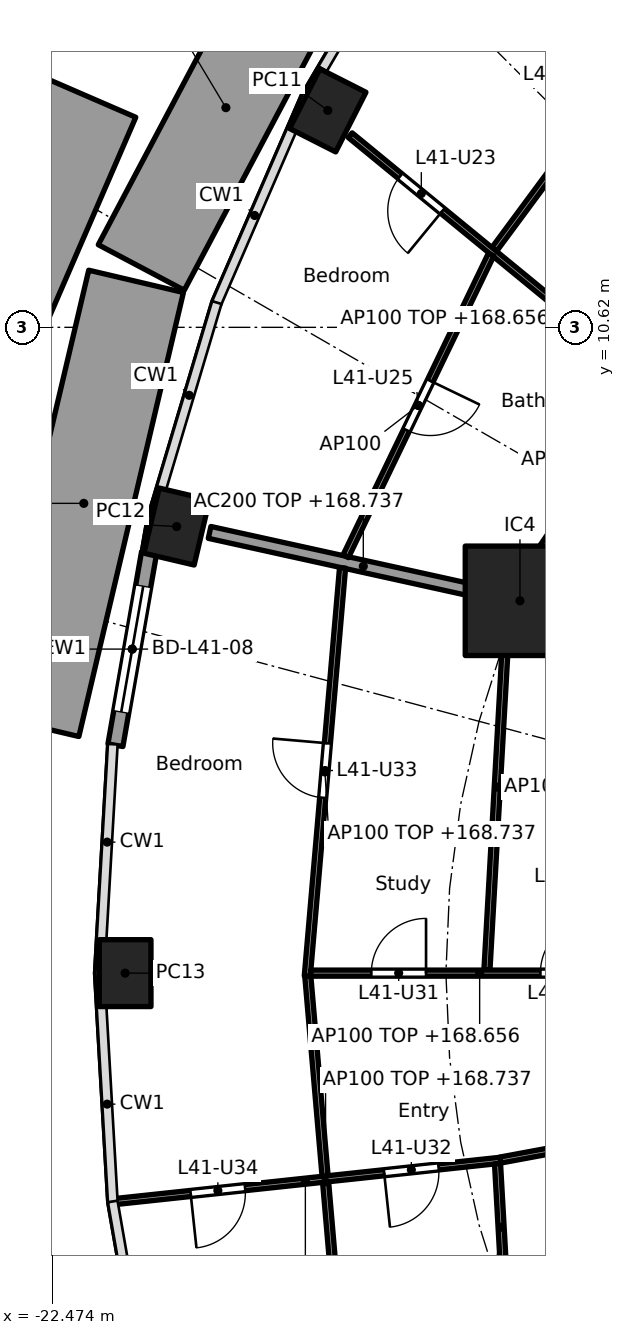
"""IFC4 building model, lengths in metres.
Left out: names, types, materials, properties, quantities, classifications, styles, units other than length and angle.
Written with IfcOpenShell. Run it as: python <this file> out.ifc"""

import sys

from ifc_helpers import new_model, si_unit, direction, frame, frame_2d, origin, origin_2d, place, context, subcontext, project, spatial, rectangle, hollow_rectangle, extrude, element, fill, save


model = new_model("IFC4")
c1 = context("Model", 3, precision=1e-05, world=origin(), true_north=direction((0.0, 1.0)))
c2 = subcontext(c1, "Body", "Model", "MODEL_VIEW")
j1 = project(units=[si_unit("LENGTHUNIT", "METRE"), si_unit("PLANEANGLEUNIT", "RADIAN")], contexts=[c1])
p1 = place(None, origin())
s1 = spatial("IfcSite", under=j1, at=p1, CompositionType="ELEMENT")
p2 = place(p1, origin())
s2 = spatial("IfcBuilding", under=s1, at=p2, CompositionType="ELEMENT")
p3 = place(p2, frame((0.0, 0.0, 165.9)))
s3 = spatial("IfcBuildingStorey", under=s2, at=p3, CompositionType="ELEMENT", Elevation=165.9)
for number, where, z_axis, x_axis in (
    (1, (-17.942, 14.188, -0.26), (0.0, 0.0, 1.0), (-0.452, -0.892, 0.0)),
    (2, (-20.427, 7.344, -0.26), (0.0, 0.0, 1.0), (-0.229, -0.973, 0.0)),
    (3, (-21.275, 0.0, -0.26), (0.0, 0.0, 1.0), (0.0, -1.0, 0.0)),
):
    element("IfcColumn", number, at=place(p3, frame(where, z_axis=z_axis, x_axis=x_axis)), inside=s3, PredefinedType="COLUMN", context=c2, shape_type="SweptSolid", body=[
        extrude(hollow_rectangle(XDim=1.1, YDim=0.85, WallThickness=0.036, at=origin_2d()), origin(), (0.0, 0.0, 1.0), 3.96),
    ])
p4 = place(p3, frame((-14.782, 6.123, 0.0), z_axis=(0.0, 0.0, 1.0), x_axis=(1.0, 0.0, 0.0)))
e4 = element("IfcColumn", 4, at=p4, inside=s3, PredefinedType="COLUMN", context=c2, shape_type="SweptSolid", body=[
    extrude(rectangle(XDim=1.8, YDim=1.8, at=origin_2d()), origin(), (0.0, 0.0, 1.0), 3.7),
])
p5 = place(p3, frame((-21.435, 3.747, 0.0), z_axis=(0.0, 0.0, 1.0), x_axis=(0.172223552479, 0.98505789067, 0.0)))
e5 = element("IfcWall", 5, at=p5, inside=s3, PredefinedType="SOLIDWALL", context=c2, shape_type="SweptSolid", body=[
    extrude(rectangle(XDim=3.211, YDim=0.25, at=frame_2d((1.605, 0.0))), origin(), (0.0, 0.0, 1.0), 3.44),
])
p6 = place(p5, frame((0.555, 0.0, 0.0)))
e6 = element("IfcOpeningElement", 6, at=p6, cuts=e5, PredefinedType="OPENING", context=c2, shape_type="SweptSolid", body=[
    extrude(rectangle(XDim=2.1, YDim=2.4, at=frame_2d((1.05, 1.2))), frame((0.0, 0.135, 0.0), z_axis=(0.0, -1.0, 0.0), x_axis=(1.0, 0.0, 0.0)), (0.0, 0.0, 1.0), 0.27),
])
p7 = place(p3, frame((-26.108, 4.525, 0.0), z_axis=(0.0, 0.0, 1.0), x_axis=(0.397508674367, 0.917598416413, 0.0)))
e7 = element("IfcWall", 7, at=p7, inside=s3, PredefinedType="SOLIDWALL", context=c2, shape_type="SweptSolid", body=[
    extrude(rectangle(XDim=10.753, YDim=1.6, at=frame_2d((5.376, 0.0))), origin(), (0.0, 0.0, 1.0), 1.1),
])
p8 = place(p3, frame((-21.095, 11.376, 0.0), z_axis=(0.0, 0.0, 1.0), x_axis=(-0.229218917717, -0.973374895793, 0.0)))
e8 = element("IfcWall", 8, at=p8, inside=s3, PredefinedType="SOLIDWALL", context=c2, shape_type="SweptSolid", body=[
    extrude(rectangle(XDim=7.501, YDim=1.6, at=frame_2d((3.751, 0.0))), origin(), (0.0, 0.0, 1.0), 1.1),
])
p9 = place(p3, frame((-18.227, 16.86, 0.0), z_axis=(0.0, 0.0, 1.0), x_axis=(-0.467931103726, -0.883764947351, 0.0)))
e9 = element("IfcWall", 9, at=p9, inside=s3, PredefinedType="SOLIDWALL", context=c2, shape_type="SweptSolid", body=[
    extrude(rectangle(XDim=5.947, YDim=1.6, at=frame_2d((2.973, 0.0))), origin(), (0.0, 0.0, 1.0), 1.1),
])
p10 = place(p3, frame((-12.657, 5.243, 0.0), z_axis=(0.0, 0.0, 1.0), x_axis=(-0.923859888513, 0.38273085373, 0.0)))
e10 = element("IfcWall", 10, at=p10, inside=s3, PredefinedType="PARTITIONING", context=c2, shape_type="SweptSolid", body=[
    extrude(rectangle(XDim=2.199, YDim=0.2, at=frame_2d((1.1, 0.0))), origin(), (0.0, 0.0, 1.0), 3.44),
])
p11 = place(p3, frame((-14.831, 6.134, 0.0), z_axis=(0.0, 0.0, 1.0), x_axis=(-0.976568396888, 0.215207263354, 0.0)))
e11 = element("IfcWall", 11, at=p11, inside=s3, PredefinedType="PARTITIONING", context=c2, shape_type="SweptSolid", body=[
    extrude(rectangle(XDim=5.177, YDim=0.2, at=frame_2d((2.588, 0.0))), origin(), (0.0, 0.0, 1.0), 2.837),
])
p12 = place(p3, frame((-11.773, 16.542, 0.0), z_axis=(0.0, 0.0, 1.0), x_axis=(-0.594694305999, -0.803951915485, 0.0)))
e12 = element("IfcWall", 12, at=p12, inside=s3, PredefinedType="PARTITIONING", context=c2, shape_type="SweptSolid", body=[
    extrude(rectangle(XDim=5.772, YDim=0.1, at=frame_2d((2.886, 0.0))), origin(), (0.0, 0.0, 1.0), 2.837),
])
p13 = place(p12, frame((2.461, 0.0, 0.0)))
e13 = element("IfcOpeningElement", 13, at=p13, cuts=e12, PredefinedType="OPENING", context=c2, shape_type="SweptSolid", body=[
    extrude(rectangle(XDim=0.9, YDim=2.1, at=frame_2d((0.45, 1.05))), frame((0.0, 0.06, 0.0), z_axis=(0.0, -1.0, 0.0), x_axis=(1.0, 0.0, 0.0)), (0.0, 0.0, 1.0), 0.12),
])
p14 = place(p3, frame((-10.189, 7.721, 0.0), z_axis=(0.0, 0.0, 1.0), x_axis=(-0.773134429339, 0.634242188892, 0.0)))
e14 = element("IfcWall", 14, at=p14, inside=s3, PredefinedType="PARTITIONING", context=c2, shape_type="SweptSolid", body=[
    extrude(rectangle(XDim=9.552, YDim=0.1, at=frame_2d((4.776, 0.0))), origin(), (0.0, 0.0, 1.0), 2.756),
])
p15 = place(p14, frame((7.59, 0.0, 0.0)))
e15 = element("IfcOpeningElement", 15, at=p15, cuts=e14, PredefinedType="OPENING", context=c2, shape_type="SweptSolid", body=[
    extrude(rectangle(XDim=0.9, YDim=2.1, at=frame_2d((0.45, 1.05))), frame((0.0, 0.06, 0.0), z_axis=(0.0, -1.0, 0.0), x_axis=(1.0, 0.0, 0.0)), (0.0, 0.0, 1.0), 0.12),
])
p16 = place(p14, frame((1.104, 0.0, 0.0)))
e16 = element("IfcOpeningElement", 16, at=p16, cuts=e14, PredefinedType="OPENING", context=c2, shape_type="SweptSolid", body=[
    extrude(rectangle(XDim=0.9, YDim=2.1, at=frame_2d((0.45, 1.05))), frame((0.0, 0.06, 0.0), z_axis=(0.0, -1.0, 0.0), x_axis=(1.0, 0.0, 0.0)), (0.0, 0.0, 1.0), 0.12),
])
p17 = place(p3, frame((-12.619, 9.65, 0.0), z_axis=(0.0, 0.0, 1.0), x_axis=(-0.561046521684, -0.82778427172, 0.0)))
e17 = element("IfcWall", 17, at=p17, inside=s3, PredefinedType="PARTITIONING", context=c2, shape_type="SweptSolid", body=[
    extrude(rectangle(XDim=4.109, YDim=0.1, at=frame_2d((2.054, 0.0))), origin(), (0.0, 0.0, 1.0), 3.44),
])
p18 = place(p3, frame((-15.257, 11.816, 0.0), z_axis=(0.0, 0.0, 1.0), x_axis=(-0.434027506504, -0.900899619046, 0.0)))
e18 = element("IfcWall", 18, at=p18, inside=s3, PredefinedType="PARTITIONING", context=c2, shape_type="SweptSolid", body=[
    extrude(rectangle(XDim=5.508, YDim=0.1, at=frame_2d((2.754, 0.0))), origin(), (0.0, 0.0, 1.0), 3.44),
])
p19 = place(p18, frame((2.304, 0.0, 0.0)))
e19 = element("IfcOpeningElement", 19, at=p19, cuts=e18, PredefinedType="OPENING", context=c2, shape_type="SweptSolid", body=[
    extrude(rectangle(XDim=0.9, YDim=2.1, at=frame_2d((0.45, 1.05))), frame((0.0, 0.06, 0.0), z_axis=(0.0, -1.0, 0.0), x_axis=(1.0, 0.0, 0.0)), (0.0, 0.0, 1.0), 0.12),
])
p20 = place(p3, frame((-14.986, 6.067, 0.0), z_axis=(0.0, 0.0, 1.0), x_axis=(-0.056311398802, -0.998413254302, 0.0)))
e20 = element("IfcWall", 20, at=p20, inside=s3, PredefinedType="PARTITIONING", context=c2, shape_type="SweptSolid", body=[
    extrude(rectangle(XDim=6.026, YDim=0.1, at=frame_2d((3.013, 0.0))), origin(), (0.0, 0.0, 1.0), 2.837),
])
p21 = place(p3, frame((-17.7, 6.664, 0.0), z_axis=(0.0, 0.0, 1.0), x_axis=(-0.086004282666, -0.996294767307, 0.0)))
e21 = element("IfcWall", 21, at=p21, inside=s3, PredefinedType="PARTITIONING", context=c2, shape_type="SweptSolid", body=[
    extrude(rectangle(XDim=6.739, YDim=0.1, at=frame_2d((3.37, 0.0))), origin(), (0.0, 0.0, 1.0), 2.837),
])
p22 = place(p21, frame((2.895, 0.0, 0.0)))
e22 = element("IfcOpeningElement", 22, at=p22, cuts=e21, PredefinedType="OPENING", context=c2, shape_type="SweptSolid", body=[
    extrude(rectangle(XDim=0.9, YDim=2.1, at=frame_2d((0.45, 1.05))), frame((0.0, 0.06, 0.0), z_axis=(0.0, -1.0, 0.0), x_axis=(1.0, 0.0, 0.0)), (0.0, 0.0, 1.0), 0.12),
])
p23 = place(p3, frame((-12.665, 0.0, 0.0), z_axis=(0.0, 0.0, 1.0), x_axis=(-1.0, 0.0, 0.0)))
e23 = element("IfcWall", 23, at=p23, inside=s3, PredefinedType="PARTITIONING", context=c2, shape_type="SweptSolid", body=[
    extrude(rectangle(XDim=5.56, YDim=0.1, at=frame_2d((2.78, 0.0))), origin(), (0.0, 0.0, 1.0), 2.756),
])
p24 = place(p23, frame((0.882, 0.0, 0.0)))
e24 = element("IfcOpeningElement", 24, at=p24, cuts=e23, PredefinedType="OPENING", context=c2, shape_type="SweptSolid", body=[
    extrude(rectangle(XDim=0.9, YDim=2.1, at=frame_2d((0.45, 1.05))), frame((0.0, 0.06, 0.0), z_axis=(0.0, -1.0, 0.0), x_axis=(1.0, 0.0, 0.0)), (0.0, 0.0, 1.0), 0.12),
])
p25 = place(p23, frame((3.662, 0.0, 0.0)))
e25 = element("IfcOpeningElement", 25, at=p25, cuts=e23, PredefinedType="OPENING", context=c2, shape_type="SweptSolid", body=[
    extrude(rectangle(XDim=0.9, YDim=2.1, at=frame_2d((0.45, 1.05))), frame((0.0, 0.06, 0.0), z_axis=(0.0, -1.0, 0.0), x_axis=(1.0, 0.0, 0.0)), (0.0, 0.0, 1.0), 0.12),
])
p26 = place(p3, frame((-18.271, -0.05, 0.0), z_axis=(0.0, 0.0, 1.0), x_axis=(0.086018199227, -0.996293565874, 0.0)))
e26 = element("IfcWall", 26, at=p26, inside=s3, PredefinedType="PARTITIONING", context=c2, shape_type="SweptSolid", body=[
    extrude(rectangle(XDim=6.789, YDim=0.1, at=frame_2d((3.395, 0.0))), origin(), (0.0, 0.0, 1.0), 2.837),
])
p27 = place(p3, frame((-12.663, -2.621, 0.0), z_axis=(0.0, 0.0, 1.0), x_axis=(-0.983176884312, -0.182655999505, 0.0)))
e27 = element("IfcWall", 27, at=p27, inside=s3, PredefinedType="PARTITIONING", context=c2, shape_type="SweptSolid", body=[
    extrude(rectangle(XDim=2.483, YDim=0.1, at=frame_2d((1.242, 0.0))), origin(), (0.0, 0.0, 1.0), 2.756),
])
p28 = place(p27, frame((0.792, 0.0, 0.0)))
e28 = element("IfcOpeningElement", 28, at=p28, cuts=e27, PredefinedType="OPENING", context=c2, shape_type="SweptSolid", body=[
    extrude(rectangle(XDim=0.9, YDim=2.1, at=frame_2d((0.45, 1.05))), frame((0.0, 0.06, 0.0), z_axis=(0.0, -1.0, 0.0), x_axis=(1.0, 0.0, 0.0)), (0.0, 0.0, 1.0), 0.12),
])
p29 = place(p3, frame((-15.104, -3.078, 0.0), z_axis=(0.0, 0.0, 1.0), x_axis=(-0.994316167803, -0.106467640365, 0.0)))
e29 = element("IfcWall", 29, at=p29, inside=s3, PredefinedType="PARTITIONING", context=c2, shape_type="SweptSolid", body=[
    extrude(rectangle(XDim=6.45, YDim=0.1, at=frame_2d((3.225, 0.0))), origin(), (0.0, 0.0, 1.0), 2.905),
])
p30 = place(p29, frame((1.022, 0.0, 0.0)))
e30 = element("IfcOpeningElement", 30, at=p30, cuts=e29, PredefinedType="OPENING", context=c2, shape_type="SweptSolid", body=[
    extrude(rectangle(XDim=0.9, YDim=2.1, at=frame_2d((0.45, 1.05))), frame((0.0, 0.06, 0.0), z_axis=(0.0, -1.0, 0.0), x_axis=(1.0, 0.0, 0.0)), (0.0, 0.0, 1.0), 0.12),
])
p31 = place(p29, frame((4.223, 0.0, 0.0)))
e31 = element("IfcOpeningElement", 31, at=p31, cuts=e29, PredefinedType="OPENING", context=c2, shape_type="SweptSolid", body=[
    extrude(rectangle(XDim=0.9, YDim=2.1, at=frame_2d((0.45, 1.05))), frame((0.0, 0.06, 0.0), z_axis=(0.0, -1.0, 0.0), x_axis=(1.0, 0.0, 0.0)), (0.0, 0.0, 1.0), 0.12),
])
p32 = place(p3, frame((-15.151, -3.133, 0.0), z_axis=(0.0, 0.0, 1.0), x_axis=(0.05637501378, -0.998409664327, 0.0)))
e32 = element("IfcWall", 32, at=p32, inside=s3, PredefinedType="PARTITIONING", context=c2, shape_type="SweptSolid", body=[
    extrude(rectangle(XDim=2.988, YDim=0.1, at=frame_2d((1.494, 0.0))), origin(), (0.0, 0.0, 1.0), 2.837),
])
p33 = place(p6, origin())
e33 = element("IfcDoor", 33, at=p33, inside=s3, OperationType="SLIDING_TO_LEFT", PredefinedType="DOOR", context=c2, shape_type="SweptSolid", body=[
    extrude(rectangle(XDim=2.1, YDim=2.4, at=frame_2d((1.05, 1.2))), frame((0.0, 0.025, 0.0), z_axis=(0.0, -1.0, 0.0), x_axis=(1.0, 0.0, 0.0)), (0.0, 0.0, 1.0), 0.05),
])
fill(e6, e33)
p34 = place(p15, origin())
e34 = element("IfcDoor", 34, at=p34, inside=s3, OperationType="SINGLE_SWING_LEFT", PredefinedType="DOOR", context=c2, shape_type="SweptSolid", body=[
    extrude(rectangle(XDim=0.9, YDim=2.1, at=frame_2d((0.45, 1.05))), frame((0.0, 0.025, 0.0), z_axis=(0.0, -1.0, 0.0), x_axis=(1.0, 0.0, 0.0)), (0.0, 0.0, 1.0), 0.05),
])
fill(e15, e34)
p35 = place(p19, origin())
e35 = element("IfcDoor", 35, at=p35, inside=s3, OperationType="SINGLE_SWING_LEFT", PredefinedType="DOOR", context=c2, shape_type="SweptSolid", body=[
    extrude(rectangle(XDim=0.9, YDim=2.1, at=frame_2d((0.45, 1.05))), frame((0.0, 0.025, 0.0), z_axis=(0.0, -1.0, 0.0), x_axis=(1.0, 0.0, 0.0)), (0.0, 0.0, 1.0), 0.05),
])
fill(e19, e35)
p36 = place(p24, frame((0.9, 0.0, 0.0), x_axis=(-1.0, 0.0, 0.0)))
e36 = element("IfcDoor", 36, at=p36, inside=s3, OperationType="SINGLE_SWING_RIGHT", PredefinedType="DOOR", context=c2, shape_type="SweptSolid", body=[
    extrude(rectangle(XDim=0.9, YDim=2.1, at=frame_2d((0.45, 1.05))), frame((0.0, 0.025, 0.0), z_axis=(0.0, -1.0, 0.0), x_axis=(1.0, 0.0, 0.0)), (0.0, 0.0, 1.0), 0.05),
])
fill(e24, e36)
p37 = place(p25, frame((0.9, 0.0, 0.0), x_axis=(-1.0, 0.0, 0.0)))
e37 = element("IfcDoor", 37, at=p37, inside=s3, OperationType="SINGLE_SWING_RIGHT", PredefinedType="DOOR", context=c2, shape_type="SweptSolid", body=[
    extrude(rectangle(XDim=0.9, YDim=2.1, at=frame_2d((0.45, 1.05))), frame((0.0, 0.025, 0.0), z_axis=(0.0, -1.0, 0.0), x_axis=(1.0, 0.0, 0.0)), (0.0, 0.0, 1.0), 0.05),
])
fill(e25, e37)
p38 = place(p30, origin())
e38 = element("IfcDoor", 38, at=p38, inside=s3, OperationType="SINGLE_SWING_RIGHT", PredefinedType="DOOR", context=c2, shape_type="SweptSolid", body=[
    extrude(rectangle(XDim=0.9, YDim=2.1, at=frame_2d((0.45, 1.05))), frame((0.0, 0.025, 0.0), z_axis=(0.0, -1.0, 0.0), x_axis=(1.0, 0.0, 0.0)), (0.0, 0.0, 1.0), 0.05),
])
fill(e30, e38)
p39 = place(p22, frame((0.9, 0.0, 0.0), x_axis=(-1.0, 0.0, 0.0)))
e39 = element("IfcDoor", 39, at=p39, inside=s3, OperationType="SINGLE_SWING_RIGHT", PredefinedType="DOOR", context=c2, shape_type="SweptSolid", body=[
    extrude(rectangle(XDim=0.9, YDim=2.1, at=frame_2d((0.45, 1.05))), frame((0.0, 0.025, 0.0), z_axis=(0.0, -1.0, 0.0), x_axis=(1.0, 0.0, 0.0)), (0.0, 0.0, 1.0), 0.05),
])
fill(e22, e39)
p40 = place(p31, origin())
e40 = element("IfcDoor", 40, at=p40, inside=s3, OperationType="SINGLE_SWING_RIGHT", PredefinedType="DOOR", context=c2, shape_type="SweptSolid", body=[
    extrude(rectangle(XDim=0.9, YDim=2.1, at=frame_2d((0.45, 1.05))), frame((0.0, 0.025, 0.0), z_axis=(0.0, -1.0, 0.0), x_axis=(1.0, 0.0, 0.0)), (0.0, 0.0, 1.0), 0.05),
])
fill(e31, e40)
save(model, sys.argv[1])
